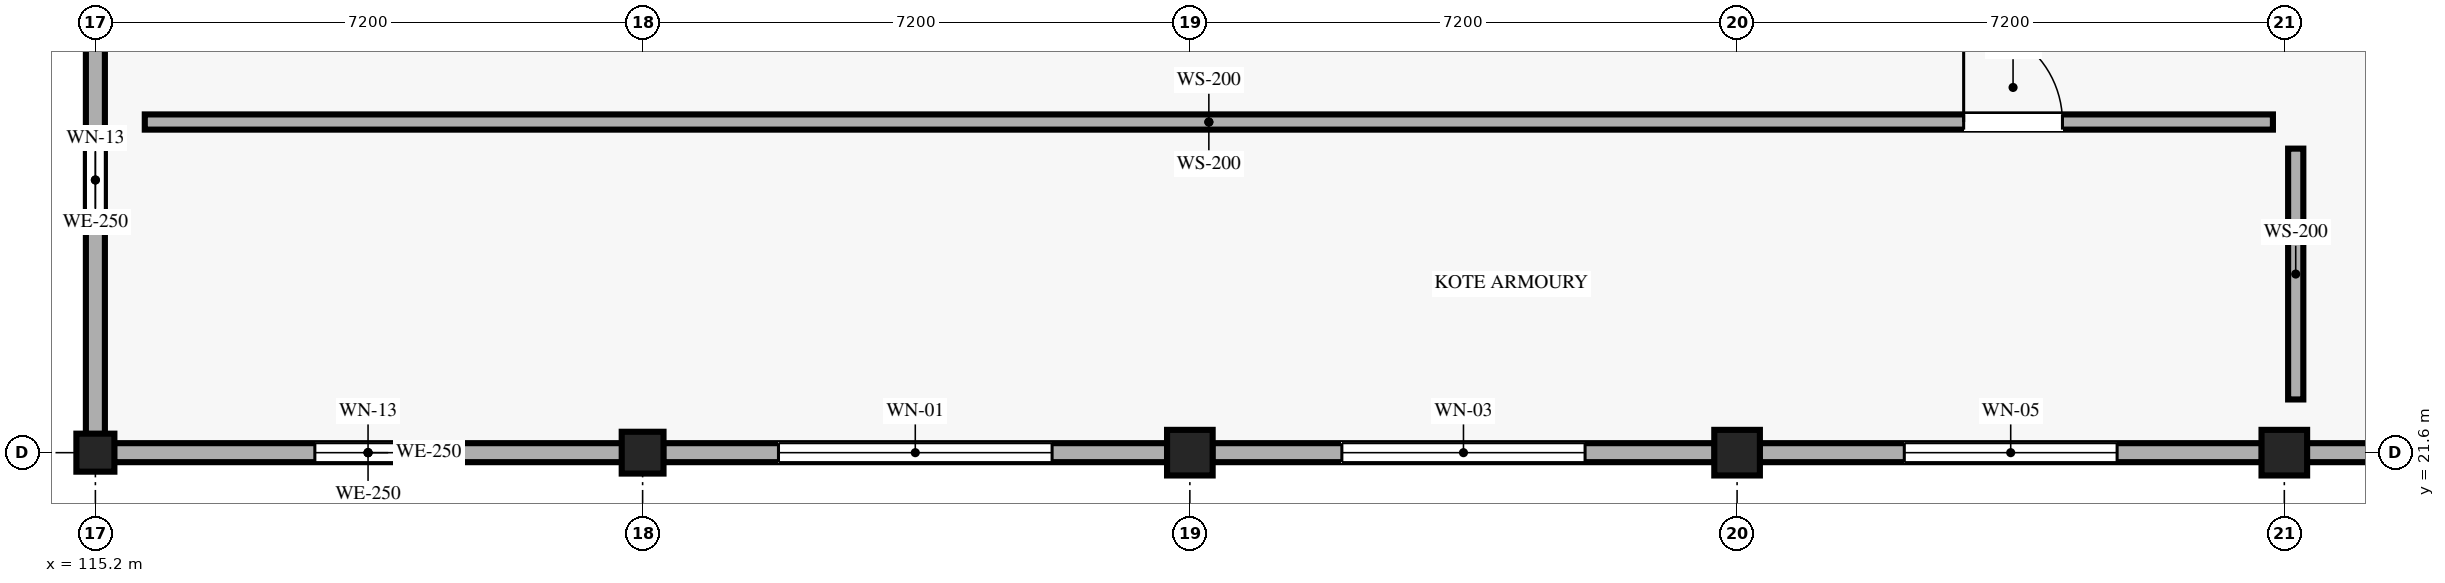
"""IFC4 building model, lengths in metres.
Left out: names, types, materials, properties, quantities, classifications, styles, units other than length and angle.
Written with IfcOpenShell. Run it as: python <this file> out.ifc"""

import sys

from ifc_helpers import new_model, si_unit, direction, frame, frame_2d, origin, origin_2d, place, context, subcontext, project, spatial, rectangle, extrude, element, fill, save


model = new_model("IFC4")
c1 = context("Model", 3, precision=1e-05, world=origin(), true_north=direction((0.0, 1.0)))
c2 = subcontext(c1, "Body", "Model", "MODEL_VIEW")
j1 = project(units=[si_unit("LENGTHUNIT", "METRE"), si_unit("PLANEANGLEUNIT", "RADIAN")], contexts=[c1])
p1 = place(None, origin())
s1 = spatial("IfcSite", under=j1, at=p1, CompositionType="ELEMENT")
p2 = place(p1, origin())
s2 = spatial("IfcBuilding", under=s1, at=p2, CompositionType="ELEMENT")
p3 = place(p2, frame((0.0, 0.0, 17.55)))
s3 = spatial("IfcBuildingStorey", under=s2, at=p3, CompositionType="ELEMENT", Elevation=17.55)
p4 = place(p3, frame((115.2, 21.6, 0.0), z_axis=(0.0, 0.0, 1.0), x_axis=(1.0, 0.0, 0.0)))
e1 = element("IfcColumn", 1, at=p4, inside=s3, PredefinedType="COLUMN", context=c2, shape_type="SweptSolid", body=[
    extrude(rectangle(XDim=0.5, YDim=0.5, at=origin_2d()), origin(), (0.0, 0.0, 1.0), 4.05),
])
p5 = place(p3, frame((122.4, 21.6, 0.0), z_axis=(0.0, 0.0, 1.0), x_axis=(1.0, 0.0, 0.0)))
e2 = element("IfcColumn", 2, at=p5, inside=s3, PredefinedType="COLUMN", context=c2, shape_type="SweptSolid", body=[
    extrude(rectangle(XDim=0.55, YDim=0.55, at=origin_2d()), origin(), (0.0, 0.0, 1.0), 4.05),
])
for number, where, z_axis, x_axis in (
    (3, (129.6, 21.6, 0.0), (0.0, 0.0, 1.0), (1.0, 0.0, 0.0)),
    (4, (136.8, 21.6, 0.0), (0.0, 0.0, 1.0), (1.0, 0.0, 0.0)),
    (5, (144.0, 21.6, 0.0), (0.0, 0.0, 1.0), (1.0, 0.0, 0.0)),
):
    element("IfcColumn", number, at=place(p3, frame(where, z_axis=z_axis, x_axis=x_axis)), inside=s3, PredefinedType="COLUMN", context=c2, shape_type="SweptSolid", body=[
        extrude(rectangle(XDim=0.6, YDim=0.6, at=origin_2d()), origin(), (0.0, 0.0, 1.0), 4.05),
    ])
p6 = place(p3, frame((115.445, 21.6, 0.0), z_axis=(0.0, 0.0, 1.0), x_axis=(1.0, 0.0, 0.0)))
e6 = element("IfcWall", 6, at=p6, inside=s3, PredefinedType="SOLIDWALL", context=c2, shape_type="SweptSolid", body=[
    extrude(rectangle(XDim=6.685, YDim=0.25, at=frame_2d((3.342, 0.0))), origin(), (0.0, 0.0, 1.0), 3.295),
])
p7 = place(p6, frame((2.643, 0.0, 0.85)))
e7 = element("IfcOpeningElement", 7, at=p7, cuts=e6, PredefinedType="OPENING", context=c2, shape_type="SweptSolid", body=[
    extrude(rectangle(XDim=1.4, YDim=1.6, at=frame_2d((0.7, 0.8))), frame((0.0, 0.135, 0.0), z_axis=(0.0, -1.0, 0.0), x_axis=(1.0, 0.0, 0.0)), (0.0, 0.0, 1.0), 0.27),
])
p8 = place(p3, frame((122.67, 21.6, 0.0), z_axis=(0.0, 0.0, 1.0), x_axis=(1.0, 0.0, 0.0)))
e8 = element("IfcWall", 8, at=p8, inside=s3, PredefinedType="SOLIDWALL", context=c2, shape_type="SweptSolid", body=[
    extrude(rectangle(XDim=6.635, YDim=0.25, at=frame_2d((3.317, 0.0))), origin(), (0.0, 0.0, 1.0), 3.295),
])
p9 = place(p8, frame((1.518, 0.0, 0.85)))
e9 = element("IfcOpeningElement", 9, at=p9, cuts=e8, PredefinedType="OPENING", context=c2, shape_type="SweptSolid", body=[
    extrude(rectangle(XDim=3.6, YDim=2.05, at=frame_2d((1.8, 1.025))), frame((0.0, 0.135, 0.0), z_axis=(0.0, -1.0, 0.0), x_axis=(1.0, 0.0, 0.0)), (0.0, 0.0, 1.0), 0.27),
])
p10 = place(p3, frame((129.895, 21.6, 0.0), z_axis=(0.0, 0.0, 1.0), x_axis=(1.0, 0.0, 0.0)))
e10 = element("IfcWall", 10, at=p10, inside=s3, PredefinedType="SOLIDWALL", context=c2, shape_type="SweptSolid", body=[
    extrude(rectangle(XDim=6.61, YDim=0.25, at=frame_2d((3.305, 0.0))), origin(), (0.0, 0.0, 1.0), 3.295),
])
p11 = place(p10, frame((1.705, 0.0, 0.85)))
e11 = element("IfcOpeningElement", 11, at=p11, cuts=e10, PredefinedType="OPENING", context=c2, shape_type="SweptSolid", body=[
    extrude(rectangle(XDim=3.2, YDim=1.95, at=frame_2d((1.6, 0.975))), frame((0.0, 0.135, 0.0), z_axis=(0.0, -1.0, 0.0), x_axis=(1.0, 0.0, 0.0)), (0.0, 0.0, 1.0), 0.27),
])
p12 = place(p3, frame((137.095, 21.6, 0.0), z_axis=(0.0, 0.0, 1.0), x_axis=(1.0, 0.0, 0.0)))
e12 = element("IfcWall", 12, at=p12, inside=s3, PredefinedType="SOLIDWALL", context=c2, shape_type="SweptSolid", body=[
    extrude(rectangle(XDim=6.61, YDim=0.25, at=frame_2d((3.305, 0.0))), origin(), (0.0, 0.0, 1.0), 3.295),
])
p13 = place(p12, frame((1.905, 0.0, 0.85)))
e13 = element("IfcOpeningElement", 13, at=p13, cuts=e12, PredefinedType="OPENING", context=c2, shape_type="SweptSolid", body=[
    extrude(rectangle(XDim=2.8, YDim=1.85, at=frame_2d((1.4, 0.925))), frame((0.0, 0.135, 0.0), z_axis=(0.0, -1.0, 0.0), x_axis=(1.0, 0.0, 0.0)), (0.0, 0.0, 1.0), 0.27),
])
p14 = place(p3, frame((144.295, 21.6, 0.0), z_axis=(0.0, 0.0, 1.0), x_axis=(1.0, 0.0, 0.0)))
e14 = element("IfcWall", 14, at=p14, inside=s3, PredefinedType="SOLIDWALL", context=c2, shape_type="SweptSolid", body=[
    extrude(rectangle(XDim=6.61, YDim=0.25, at=frame_2d((3.305, 0.0))), origin(), (0.0, 0.0, 1.0), 3.295),
])
p15 = place(p14, frame((2.105, 0.0, 0.85)))
e15 = element("IfcOpeningElement", 15, at=p15, cuts=e14, PredefinedType="OPENING", context=c2, shape_type="SweptSolid", body=[
    extrude(rectangle(XDim=2.4, YDim=1.75, at=frame_2d((1.2, 0.875))), frame((0.0, 0.135, 0.0), z_axis=(0.0, -1.0, 0.0), x_axis=(1.0, 0.0, 0.0)), (0.0, 0.0, 1.0), 0.27),
])
p16 = place(p3, frame((115.2, 21.845, 0.0), z_axis=(0.0, 0.0, 1.0), x_axis=(0.0, 1.0, 0.0)))
e16 = element("IfcWall", 16, at=p16, inside=s3, PredefinedType="SOLIDWALL", context=c2, shape_type="SweptSolid", body=[
    extrude(rectangle(XDim=6.685, YDim=0.25, at=frame_2d((3.343, 0.0))), origin(), (0.0, 0.0, 1.0), 3.295),
])
p17 = place(p16, frame((2.643, 0.0, 0.85)))
e17 = element("IfcOpeningElement", 17, at=p17, cuts=e16, PredefinedType="OPENING", context=c2, shape_type="SweptSolid", body=[
    extrude(rectangle(XDim=1.4, YDim=1.6, at=frame_2d((0.7, 0.8))), frame((0.0, 0.135, 0.0), z_axis=(0.0, -1.0, 0.0), x_axis=(1.0, 0.0, 0.0)), (0.0, 0.0, 1.0), 0.27),
])
p18 = place(p3, frame((144.15, 22.3, 0.0), z_axis=(0.0, 0.0, 1.0), x_axis=(0.0, 1.0, 0.0)))
e18 = element("IfcWall", 18, at=p18, inside=s3, PredefinedType="SOLIDWALL", context=c2, shape_type="SweptSolid", body=[
    extrude(rectangle(XDim=3.3, YDim=0.2, at=frame_2d((1.65, 0.0))), origin(), (0.0, 0.0, 1.0), 3.27),
])
p19 = place(p3, frame((115.85, 25.95, 0.0), z_axis=(0.0, 0.0, 1.0), x_axis=(1.0, 0.0, 0.0)))
e19 = element("IfcWall", 19, at=p19, inside=s3, PredefinedType="SOLIDWALL", context=c2, shape_type="SweptSolid", body=[
    extrude(rectangle(XDim=28.0, YDim=0.2, at=frame_2d((14.0, 0.0))), origin(), (0.0, 0.0, 1.0), 3.83),
])
p20 = place(p19, frame((23.931, 0.0, 0.0)))
e20 = element("IfcOpeningElement", 20, at=p20, cuts=e19, PredefinedType="OPENING", context=c2, shape_type="SweptSolid", body=[
    extrude(rectangle(XDim=1.3, YDim=2.2, at=frame_2d((0.65, 1.1))), frame((0.0, 0.11, 0.0), z_axis=(0.0, -1.0, 0.0), x_axis=(1.0, 0.0, 0.0)), (0.0, 0.0, 1.0), 0.22),
])
p21 = place(p7, origin())
e21 = element("IfcWindow", 21, at=p21, inside=s3, PartitioningType="SINGLE_PANEL", PredefinedType="WINDOW", context=c2, shape_type="SweptSolid", body=[
    extrude(rectangle(XDim=1.4, YDim=1.6, at=frame_2d((0.7, 0.8))), frame((0.0, 0.03, 0.0), z_axis=(0.0, -1.0, 0.0), x_axis=(1.0, 0.0, 0.0)), (0.0, 0.0, 1.0), 0.06),
])
fill(e7, e21)
p22 = place(p9, origin())
e22 = element("IfcWindow", 22, at=p22, inside=s3, PartitioningType="SINGLE_PANEL", PredefinedType="WINDOW", context=c2, shape_type="SweptSolid", body=[
    extrude(rectangle(XDim=3.6, YDim=2.05, at=frame_2d((1.8, 1.025))), frame((0.0, 0.03, 0.0), z_axis=(0.0, -1.0, 0.0), x_axis=(1.0, 0.0, 0.0)), (0.0, 0.0, 1.0), 0.06),
])
fill(e9, e22)
p23 = place(p11, origin())
e23 = element("IfcWindow", 23, at=p23, inside=s3, PartitioningType="SINGLE_PANEL", PredefinedType="WINDOW", context=c2, shape_type="SweptSolid", body=[
    extrude(rectangle(XDim=3.2, YDim=1.95, at=frame_2d((1.6, 0.975))), frame((0.0, 0.03, 0.0), z_axis=(0.0, -1.0, 0.0), x_axis=(1.0, 0.0, 0.0)), (0.0, 0.0, 1.0), 0.06),
])
fill(e11, e23)
p24 = place(p13, origin())
e24 = element("IfcWindow", 24, at=p24, inside=s3, PartitioningType="SINGLE_PANEL", PredefinedType="WINDOW", context=c2, shape_type="SweptSolid", body=[
    extrude(rectangle(XDim=2.8, YDim=1.85, at=frame_2d((1.4, 0.925))), frame((0.0, 0.03, 0.0), z_axis=(0.0, -1.0, 0.0), x_axis=(1.0, 0.0, 0.0)), (0.0, 0.0, 1.0), 0.06),
])
fill(e13, e24)
p25 = place(p17, origin())
e25 = element("IfcWindow", 25, at=p25, inside=s3, PartitioningType="SINGLE_PANEL", PredefinedType="WINDOW", context=c2, shape_type="SweptSolid", body=[
    extrude(rectangle(XDim=1.4, YDim=1.6, at=frame_2d((0.7, 0.8))), frame((0.0, 0.03, 0.0), z_axis=(0.0, -1.0, 0.0), x_axis=(1.0, 0.0, 0.0)), (0.0, 0.0, 1.0), 0.06),
])
fill(e17, e25)
p26 = place(p20, origin())
e26 = element("IfcDoor", 26, at=p26, inside=s3, OperationType="SINGLE_SWING_LEFT", PredefinedType="DOOR", context=c2, shape_type="SweptSolid", body=[
    extrude(rectangle(XDim=1.3, YDim=2.2, at=frame_2d((0.65, 1.1))), frame((0.0, 0.025, 0.0), z_axis=(0.0, -1.0, 0.0), x_axis=(1.0, 0.0, 0.0)), (0.0, 0.0, 1.0), 0.05),
])
fill(e20, e26)
save(model, sys.argv[1])
